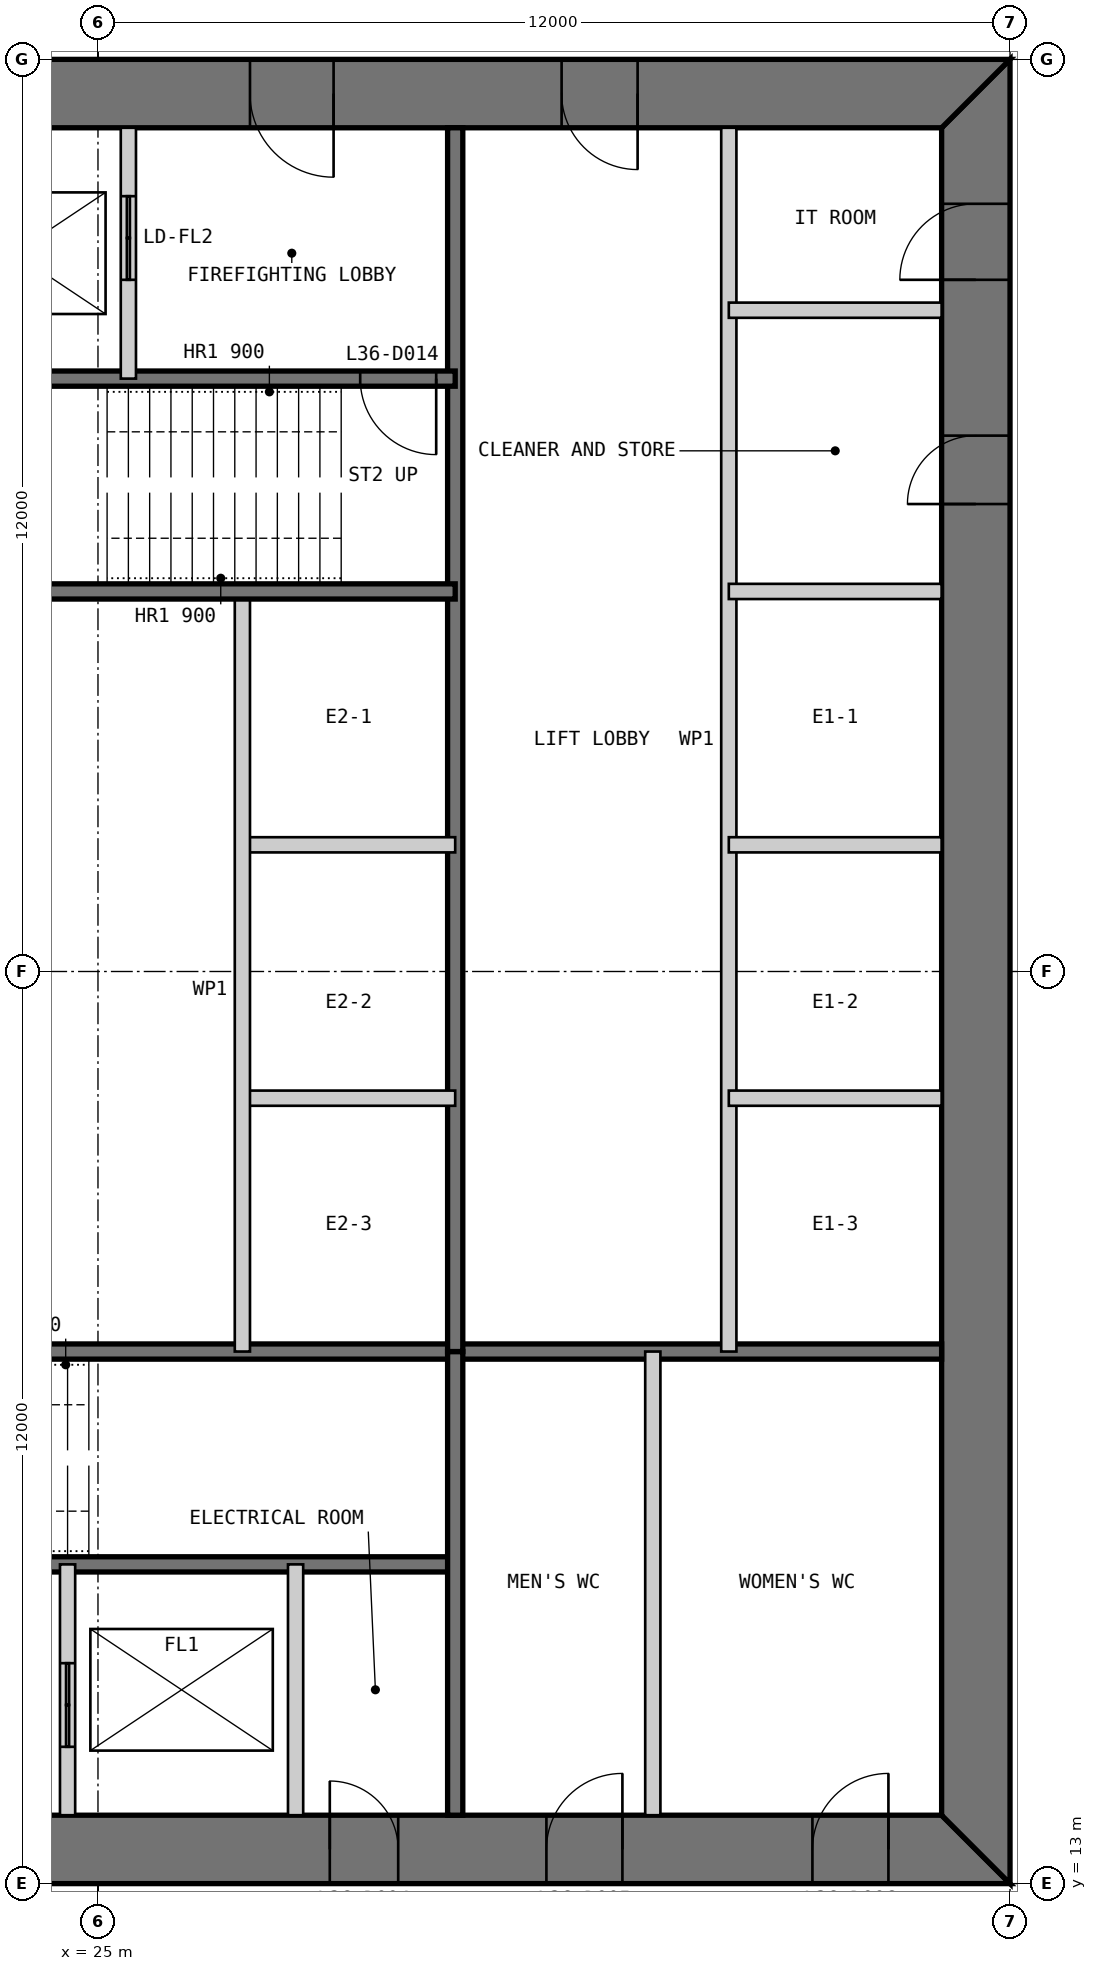
"""IFC4 building model, lengths in metres.
Left out: names, types, materials, properties, quantities, classifications, styles, units other than length and angle.
Written with IfcOpenShell. Run it as: python <this file> out.ifc"""

import sys

from ifc_helpers import new_model, si_unit, direction, frame, frame_2d, origin, place, context, subcontext, project, spatial, polyline, rectangle, outline, extrude, element, fill, save


model = new_model("IFC4")
c1 = context("Model", 3, precision=1e-05, world=origin(), true_north=direction((0.0, 1.0)))
c2 = subcontext(c1, "Body", "Model", "MODEL_VIEW")
j1 = project(units=[si_unit("LENGTHUNIT", "METRE"), si_unit("PLANEANGLEUNIT", "RADIAN")], contexts=[c1])
p1 = place(None, origin())
s1 = spatial("IfcSite", under=j1, at=p1, CompositionType="ELEMENT")
p2 = place(p1, origin())
s2 = spatial("IfcBuilding", under=s1, at=p2, CompositionType="ELEMENT")
p3 = place(p2, frame((0.0, 0.0, 154.4)))
s3 = spatial("IfcBuildingStorey", under=s2, at=p3, CompositionType="ELEMENT", Elevation=154.4)
p4 = place(p3, frame((13.0, 13.45, 0.0), z_axis=(0.0, 0.0, 1.0), x_axis=(1.0, 0.0, 0.0)))
e1 = element("IfcWall", 1, at=p4, inside=s3, PredefinedType="SHEAR", context=c2, shape_type="SweptSolid", body=[
    extrude(outline(polyline([(0.0, -0.45), (24.0, -0.45), (23.1, 0.45), (0.9, 0.45), (0.0, -0.45)])), origin(), (0.0, 0.0, 1.0), 4.0),
])
p5 = place(p4, frame((4.9, 0.0, 0.0)))
e2 = element("IfcOpeningElement", 2, at=p5, cuts=e1, PredefinedType="OPENING", context=c2, shape_type="SweptSolid", body=[
    extrude(rectangle(XDim=1.0, YDim=2.2, at=frame_2d((0.5, 1.1))), frame((0.0, 0.46, 0.0), z_axis=(0.0, -1.0, 0.0), x_axis=(1.0, 0.0, 0.0)), (0.0, 0.0, 1.0), 0.92),
])
p6 = place(p4, frame((8.9, 0.0, 0.0)))
e3 = element("IfcOpeningElement", 3, at=p6, cuts=e1, PredefinedType="OPENING", context=c2, shape_type="SweptSolid", body=[
    extrude(rectangle(XDim=1.1, YDim=2.2, at=frame_2d((0.55, 1.1))), frame((0.0, 0.46, 0.0), z_axis=(0.0, -1.0, 0.0), x_axis=(1.0, 0.0, 0.0)), (0.0, 0.0, 1.0), 0.92),
])
p7 = place(p4, frame((15.05, 0.0, 0.0)))
e4 = element("IfcOpeningElement", 4, at=p7, cuts=e1, PredefinedType="OPENING", context=c2, shape_type="SweptSolid", body=[
    extrude(rectangle(XDim=0.9, YDim=2.2, at=frame_2d((0.45, 1.1))), frame((0.0, 0.46, 0.0), z_axis=(0.0, -1.0, 0.0), x_axis=(1.0, 0.0, 0.0)), (0.0, 0.0, 1.0), 0.92),
])
p8 = place(p4, frame((17.9, 0.0, 0.0)))
e5 = element("IfcOpeningElement", 5, at=p8, cuts=e1, PredefinedType="OPENING", context=c2, shape_type="SweptSolid", body=[
    extrude(rectangle(XDim=1.0, YDim=2.2, at=frame_2d((0.5, 1.1))), frame((0.0, 0.46, 0.0), z_axis=(0.0, -1.0, 0.0), x_axis=(1.0, 0.0, 0.0)), (0.0, 0.0, 1.0), 0.92),
])
p9 = place(p4, frame((21.4, 0.0, 0.0)))
e6 = element("IfcOpeningElement", 6, at=p9, cuts=e1, PredefinedType="OPENING", context=c2, shape_type="SweptSolid", body=[
    extrude(rectangle(XDim=1.0, YDim=2.2, at=frame_2d((0.5, 1.1))), frame((0.0, 0.46, 0.0), z_axis=(0.0, -1.0, 0.0), x_axis=(1.0, 0.0, 0.0)), (0.0, 0.0, 1.0), 0.92),
])
p10 = place(p3, frame((36.55, 13.9, 0.0), z_axis=(0.0, 0.0, 1.0), x_axis=(0.0, 1.0, 0.0)))
e7 = element("IfcWall", 7, at=p10, inside=s3, PredefinedType="SHEAR", context=c2, shape_type="SweptSolid", body=[
    extrude(outline(polyline([(-0.9, -0.45), (23.1, -0.45), (22.2, 0.45), (0.0, 0.45), (-0.9, -0.45)])), origin(), (0.0, 0.0, 1.0), 4.0),
])
p11 = place(p10, frame((20.2, 0.0, 0.0)))
e8 = element("IfcOpeningElement", 8, at=p11, cuts=e7, PredefinedType="OPENING", context=c2, shape_type="SweptSolid", body=[
    extrude(rectangle(XDim=1.0, YDim=2.2, at=frame_2d((0.5, 1.1))), frame((0.0, 0.46, 0.0), z_axis=(0.0, -1.0, 0.0), x_axis=(1.0, 0.0, 0.0)), (0.0, 0.0, 1.0), 0.92),
])
p12 = place(p10, frame((17.25, 0.0, 0.0)))
e9 = element("IfcOpeningElement", 9, at=p12, cuts=e7, PredefinedType="OPENING", context=c2, shape_type="SweptSolid", body=[
    extrude(rectangle(XDim=0.9, YDim=2.2, at=frame_2d((0.45, 1.1))), frame((0.0, 0.46, 0.0), z_axis=(0.0, -1.0, 0.0), x_axis=(1.0, 0.0, 0.0)), (0.0, 0.0, 1.0), 0.92),
])
p13 = place(p3, frame((37.0, 36.55, 0.0), z_axis=(0.0, 0.0, 1.0), x_axis=(-1.0, 0.0, 0.0)))
e10 = element("IfcWall", 10, at=p13, inside=s3, PredefinedType="SHEAR", context=c2, shape_type="SweptSolid", body=[
    extrude(outline(polyline([(0.0, -0.45), (24.0, -0.45), (23.1, 0.45), (0.9, 0.45), (0.0, -0.45)])), origin(), (0.0, 0.0, 1.0), 4.0),
])
p14 = place(p13, frame((4.9, 0.0, 0.0)))
e11 = element("IfcOpeningElement", 11, at=p14, cuts=e10, PredefinedType="OPENING", context=c2, shape_type="SweptSolid", body=[
    extrude(rectangle(XDim=1.0, YDim=2.2, at=frame_2d((0.5, 1.1))), frame((0.0, 0.46, 0.0), z_axis=(0.0, -1.0, 0.0), x_axis=(1.0, 0.0, 0.0)), (0.0, 0.0, 1.0), 0.92),
])
p15 = place(p13, frame((8.9, 0.0, 0.0)))
e12 = element("IfcOpeningElement", 12, at=p15, cuts=e10, PredefinedType="OPENING", context=c2, shape_type="SweptSolid", body=[
    extrude(rectangle(XDim=1.1, YDim=2.2, at=frame_2d((0.55, 1.1))), frame((0.0, 0.46, 0.0), z_axis=(0.0, -1.0, 0.0), x_axis=(1.0, 0.0, 0.0)), (0.0, 0.0, 1.0), 0.92),
])
p16 = place(p13, frame((15.05, 0.0, 0.0)))
e13 = element("IfcOpeningElement", 13, at=p16, cuts=e10, PredefinedType="OPENING", context=c2, shape_type="SweptSolid", body=[
    extrude(rectangle(XDim=0.9, YDim=2.2, at=frame_2d((0.45, 1.1))), frame((0.0, 0.46, 0.0), z_axis=(0.0, -1.0, 0.0), x_axis=(1.0, 0.0, 0.0)), (0.0, 0.0, 1.0), 0.92),
])
p17 = place(p13, frame((17.9, 0.0, 0.0)))
e14 = element("IfcOpeningElement", 14, at=p17, cuts=e10, PredefinedType="OPENING", context=c2, shape_type="SweptSolid", body=[
    extrude(rectangle(XDim=1.0, YDim=2.2, at=frame_2d((0.5, 1.1))), frame((0.0, 0.46, 0.0), z_axis=(0.0, -1.0, 0.0), x_axis=(1.0, 0.0, 0.0)), (0.0, 0.0, 1.0), 0.92),
])
p18 = place(p13, frame((21.4, 0.0, 0.0)))
e15 = element("IfcOpeningElement", 15, at=p18, cuts=e10, PredefinedType="OPENING", context=c2, shape_type="SweptSolid", body=[
    extrude(rectangle(XDim=1.0, YDim=2.2, at=frame_2d((0.5, 1.1))), frame((0.0, 0.46, 0.0), z_axis=(0.0, -1.0, 0.0), x_axis=(1.0, 0.0, 0.0)), (0.0, 0.0, 1.0), 0.92),
])
p19 = place(p3, frame((20.3, 17.2, 0.0), z_axis=(0.0, 0.0, 1.0), x_axis=(1.0, 0.0, 0.0)))
e16 = element("IfcWall", 16, at=p19, inside=s3, PredefinedType="SOLIDWALL", context=c2, shape_type="SweptSolid", body=[
    extrude(rectangle(XDim=9.4, YDim=0.2, at=frame_2d((4.7, 0.0))), origin(), (0.0, 0.0, 1.0), 3.8),
])
p20 = place(p19, frame((0.25, 0.0, 0.0)))
e17 = element("IfcOpeningElement", 17, at=p20, cuts=e16, PredefinedType="OPENING", context=c2, shape_type="SweptSolid", body=[
    extrude(rectangle(XDim=1.0, YDim=2.2, at=frame_2d((0.5, 1.1))), frame((0.0, 0.11, 0.0), z_axis=(0.0, -1.0, 0.0), x_axis=(1.0, 0.0, 0.0)), (0.0, 0.0, 1.0), 0.22),
])
p21 = place(p3, frame((20.3, 20.0, 0.0), z_axis=(0.0, 0.0, 1.0), x_axis=(1.0, 0.0, 0.0)))
e18 = element("IfcWall", 18, at=p21, inside=s3, PredefinedType="SOLIDWALL", context=c2, shape_type="SweptSolid", body=[
    extrude(rectangle(XDim=15.8, YDim=0.2, at=frame_2d((7.9, 0.0))), origin(), (0.0, 0.0, 1.0), 3.8),
])
p22 = place(p3, frame((24.6, 13.9, 0.0), z_axis=(0.0, 0.0, 1.0), x_axis=(0.0, 1.0, 0.0)))
e19 = element("IfcWall", 19, at=p22, inside=s3, PredefinedType="PARTITIONING", context=c2, shape_type="SweptSolid", body=[
    extrude(rectangle(XDim=3.3, YDim=0.2, at=frame_2d((1.65, 0.0))), origin(), (0.0, 0.0, 1.0), 3.8),
])
p23 = place(p22, frame((0.9, 0.0, 0.0)))
e20 = element("IfcOpeningElement", 20, at=p23, cuts=e19, PredefinedType="OPENING", context=c2, shape_type="SweptSolid", body=[
    extrude(rectangle(XDim=1.1, YDim=2.2, at=frame_2d((0.55, 1.1))), frame((0.0, 0.11, 0.0), z_axis=(0.0, -1.0, 0.0), x_axis=(1.0, 0.0, 0.0)), (0.0, 0.0, 1.0), 0.22),
])
p24 = place(p3, frame((27.6, 13.9, 0.0), z_axis=(0.0, 0.0, 1.0), x_axis=(0.0, 1.0, 0.0)))
e21 = element("IfcWall", 21, at=p24, inside=s3, PredefinedType="PARTITIONING", context=c2, shape_type="SweptSolid", body=[
    extrude(rectangle(XDim=3.3, YDim=0.2, at=frame_2d((1.65, 0.0))), origin(), (0.0, 0.0, 1.0), 3.8),
])
p25 = place(p3, frame((29.7, 13.9, 0.0), z_axis=(0.0, 0.0, 1.0), x_axis=(0.0, 1.0, 0.0)))
e22 = element("IfcWall", 22, at=p25, inside=s3, PredefinedType="SOLIDWALL", context=c2, shape_type="SweptSolid", body=[
    extrude(rectangle(XDim=6.1, YDim=0.2, at=frame_2d((3.05, 0.0))), origin(), (0.0, 0.0, 1.0), 3.8),
])
p26 = place(p3, frame((32.3, 13.9, 0.0), z_axis=(0.0, 0.0, 1.0), x_axis=(0.0, 1.0, 0.0)))
e23 = element("IfcWall", 23, at=p26, inside=s3, PredefinedType="PARTITIONING", context=c2, shape_type="SweptSolid", body=[
    extrude(rectangle(XDim=6.1, YDim=0.2, at=frame_2d((3.05, 0.0))), origin(), (0.0, 0.0, 1.0), 3.8),
])
p27 = place(p3, frame((33.3, 36.1, 0.0), z_axis=(0.0, 0.0, 1.0), x_axis=(0.0, -1.0, 0.0)))
e24 = element("IfcWall", 24, at=p27, inside=s3, PredefinedType="PARTITIONING", context=c2, shape_type="SweptSolid", body=[
    extrude(rectangle(XDim=16.1, YDim=0.2, at=frame_2d((8.05, 0.0))), origin(), (0.0, 0.0, 1.0), 3.8),
])
p28 = place(p3, frame((29.7, 36.1, 0.0), z_axis=(0.0, 0.0, 1.0), x_axis=(0.0, -1.0, 0.0)))
e25 = element("IfcWall", 25, at=p28, inside=s3, PredefinedType="SOLIDWALL", context=c2, shape_type="SweptSolid", body=[
    extrude(rectangle(XDim=16.1, YDim=0.2, at=frame_2d((8.05, 0.0))), origin(), (0.0, 0.0, 1.0), 3.8),
])
for number, where, z_axis, x_axis in (
    (26, (36.1, 30.0, 0.0), (0.0, 0.0, 1.0), (-1.0, 0.0, 0.0)),
    (27, (36.1, 26.667, 0.0), (0.0, 0.0, 1.0), (-1.0, 0.0, 0.0)),
    (28, (36.1, 23.333, 0.0), (0.0, 0.0, 1.0), (-1.0, 0.0, 0.0)),
    (29, (29.7, 26.667, 0.0), (0.0, 0.0, 1.0), (-1.0, 0.0, 0.0)),
    (30, (29.7, 23.333, 0.0), (0.0, 0.0, 1.0), (-1.0, 0.0, 0.0)),
):
    element("IfcWall", number, at=place(p3, frame(where, z_axis=z_axis, x_axis=x_axis)), inside=s3, PredefinedType="PARTITIONING", context=c2, shape_type="SweptSolid", body=[
        extrude(rectangle(XDim=2.8, YDim=0.2, at=frame_2d((1.4, 0.0))), origin(), (0.0, 0.0, 1.0), 3.8),
    ])
p29 = place(p3, frame((26.9, 30.0, 0.0), z_axis=(0.0, 0.0, 1.0), x_axis=(0.0, -1.0, 0.0)))
e31 = element("IfcWall", 31, at=p29, inside=s3, PredefinedType="PARTITIONING", context=c2, shape_type="SweptSolid", body=[
    extrude(rectangle(XDim=10.0, YDim=0.2, at=frame_2d((5.0, 0.0))), origin(), (0.0, 0.0, 1.0), 3.8),
])
p30 = place(p3, frame((29.7, 32.8, 0.0), z_axis=(0.0, 0.0, 1.0), x_axis=(-1.0, 0.0, 0.0)))
e32 = element("IfcWall", 32, at=p30, inside=s3, PredefinedType="SOLIDWALL", context=c2, shape_type="SweptSolid", body=[
    extrude(rectangle(XDim=9.4, YDim=0.2, at=frame_2d((4.7, 0.0))), origin(), (0.0, 0.0, 1.0), 3.8),
])
p31 = place(p30, frame((0.25, 0.0, 0.0)))
e33 = element("IfcOpeningElement", 33, at=p31, cuts=e32, PredefinedType="OPENING", context=c2, shape_type="SweptSolid", body=[
    extrude(rectangle(XDim=1.0, YDim=2.2, at=frame_2d((0.5, 1.1))), frame((0.0, 0.11, 0.0), z_axis=(0.0, -1.0, 0.0), x_axis=(1.0, 0.0, 0.0)), (0.0, 0.0, 1.0), 0.22),
])
p32 = place(p3, frame((29.7, 30.0, 0.0), z_axis=(0.0, 0.0, 1.0), x_axis=(-1.0, 0.0, 0.0)))
e34 = element("IfcWall", 34, at=p32, inside=s3, PredefinedType="SOLIDWALL", context=c2, shape_type="SweptSolid", body=[
    extrude(rectangle(XDim=15.8, YDim=0.2, at=frame_2d((7.9, 0.0))), origin(), (0.0, 0.0, 1.0), 3.8),
])
p33 = place(p3, frame((25.4, 36.1, 0.0), z_axis=(0.0, 0.0, 1.0), x_axis=(0.0, -1.0, 0.0)))
e35 = element("IfcWall", 35, at=p33, inside=s3, PredefinedType="PARTITIONING", context=c2, shape_type="SweptSolid", body=[
    extrude(rectangle(XDim=3.3, YDim=0.2, at=frame_2d((1.65, 0.0))), origin(), (0.0, 0.0, 1.0), 3.8),
])
p34 = place(p33, frame((0.9, 0.0, 0.0)))
e36 = element("IfcOpeningElement", 36, at=p34, cuts=e35, PredefinedType="OPENING", context=c2, shape_type="SweptSolid", body=[
    extrude(rectangle(XDim=1.1, YDim=2.2, at=frame_2d((0.55, 1.1))), frame((0.0, 0.11, 0.0), z_axis=(0.0, -1.0, 0.0), x_axis=(1.0, 0.0, 0.0)), (0.0, 0.0, 1.0), 0.22),
])
p35 = place(p3, frame((36.1, 33.7, 0.0), z_axis=(0.0, 0.0, 1.0), x_axis=(-1.0, 0.0, 0.0)))
e37 = element("IfcWall", 37, at=p35, inside=s3, PredefinedType="PARTITIONING", context=c2, shape_type="SweptSolid", body=[
    extrude(rectangle(XDim=2.8, YDim=0.2, at=frame_2d((1.4, 0.0))), origin(), (0.0, 0.0, 1.0), 3.8),
])
p36 = place(p7, origin())
e38 = element("IfcDoor", 38, at=p36, inside=s3, OperationType="SINGLE_SWING_LEFT", PredefinedType="DOOR", context=c2, shape_type="SweptSolid", body=[
    extrude(rectangle(XDim=0.9, YDim=2.2, at=frame_2d((0.45, 1.1))), frame((0.0, 0.025, 0.0), z_axis=(0.0, -1.0, 0.0), x_axis=(1.0, 0.0, 0.0)), (0.0, 0.0, 1.0), 0.05),
    extrude(outline(polyline([(0.0, 0.0), (0.04, 0.0), (0.04, 2.16), (0.86, 2.16), (0.86, 0.0), (0.9, 0.0), (0.9, 2.2), (0.0, 2.2), (0.0, 0.0)])), frame((0.0, 0.3, 0.0), z_axis=(0.0, -1.0, 0.0), x_axis=(1.0, 0.0, 0.0)), (0.0, 0.0, 1.0), 0.6),
])
fill(e4, e38)
p37 = place(p8, origin())
e39 = element("IfcDoor", 39, at=p37, inside=s3, OperationType="SINGLE_SWING_RIGHT", PredefinedType="DOOR", context=c2, shape_type="SweptSolid", body=[
    extrude(rectangle(XDim=1.0, YDim=2.2, at=frame_2d((0.5, 1.1))), frame((0.0, 0.025, 0.0), z_axis=(0.0, -1.0, 0.0), x_axis=(1.0, 0.0, 0.0)), (0.0, 0.0, 1.0), 0.05),
    extrude(outline(polyline([(0.0, 0.0), (0.04, 0.0), (0.04, 2.16), (0.96, 2.16), (0.96, 0.0), (1.0, 0.0), (1.0, 2.2), (0.0, 2.2), (0.0, 0.0)])), frame((0.0, 0.3, 0.0), z_axis=(0.0, -1.0, 0.0), x_axis=(1.0, 0.0, 0.0)), (0.0, 0.0, 1.0), 0.6),
])
fill(e5, e39)
p38 = place(p9, origin())
e40 = element("IfcDoor", 40, at=p38, inside=s3, OperationType="SINGLE_SWING_RIGHT", PredefinedType="DOOR", context=c2, shape_type="SweptSolid", body=[
    extrude(rectangle(XDim=1.0, YDim=2.2, at=frame_2d((0.5, 1.1))), frame((0.0, 0.025, 0.0), z_axis=(0.0, -1.0, 0.0), x_axis=(1.0, 0.0, 0.0)), (0.0, 0.0, 1.0), 0.05),
    extrude(outline(polyline([(0.0, 0.0), (0.04, 0.0), (0.04, 2.16), (0.96, 2.16), (0.96, 0.0), (1.0, 0.0), (1.0, 2.2), (0.0, 2.2), (0.0, 0.0)])), frame((0.0, 0.3, 0.0), z_axis=(0.0, -1.0, 0.0), x_axis=(1.0, 0.0, 0.0)), (0.0, 0.0, 1.0), 0.6),
])
fill(e6, e40)
p39 = place(p14, origin())
e41 = element("IfcDoor", 41, at=p39, inside=s3, OperationType="SINGLE_SWING_LEFT", PredefinedType="DOOR", context=c2, shape_type="SweptSolid", body=[
    extrude(rectangle(XDim=1.0, YDim=2.2, at=frame_2d((0.5, 1.1))), frame((0.0, 0.025, 0.0), z_axis=(0.0, -1.0, 0.0), x_axis=(1.0, 0.0, 0.0)), (0.0, 0.0, 1.0), 0.05),
    extrude(outline(polyline([(0.0, 0.0), (0.04, 0.0), (0.04, 2.16), (0.96, 2.16), (0.96, 0.0), (1.0, 0.0), (1.0, 2.2), (0.0, 2.2), (0.0, 0.0)])), frame((0.0, 0.3, 0.0), z_axis=(0.0, -1.0, 0.0), x_axis=(1.0, 0.0, 0.0)), (0.0, 0.0, 1.0), 0.6),
])
fill(e11, e41)
p40 = place(p15, origin())
e42 = element("IfcDoor", 42, at=p40, inside=s3, OperationType="SINGLE_SWING_LEFT", PredefinedType="DOOR", context=c2, shape_type="SweptSolid", body=[
    extrude(rectangle(XDim=1.1, YDim=2.2, at=frame_2d((0.55, 1.1))), frame((0.0, 0.025, 0.0), z_axis=(0.0, -1.0, 0.0), x_axis=(1.0, 0.0, 0.0)), (0.0, 0.0, 1.0), 0.05),
    extrude(outline(polyline([(0.0, 0.0), (0.04, 0.0), (0.04, 2.16), (1.06, 2.16), (1.06, 0.0), (1.1, 0.0), (1.1, 2.2), (0.0, 2.2), (0.0, 0.0)])), frame((0.0, 0.3, 0.0), z_axis=(0.0, -1.0, 0.0), x_axis=(1.0, 0.0, 0.0)), (0.0, 0.0, 1.0), 0.6),
])
fill(e12, e42)
p41 = place(p31, origin())
e43 = element("IfcDoor", 43, at=p41, inside=s3, OperationType="SINGLE_SWING_LEFT", PredefinedType="DOOR", context=c2, shape_type="SweptSolid", body=[
    extrude(rectangle(XDim=1.0, YDim=2.2, at=frame_2d((0.5, 1.1))), frame((0.0, 0.025, 0.0), z_axis=(0.0, -1.0, 0.0), x_axis=(1.0, 0.0, 0.0)), (0.0, 0.0, 1.0), 0.05),
])
fill(e33, e43)
p42 = place(p11, origin())
e44 = element("IfcDoor", 44, at=p42, inside=s3, OperationType="SINGLE_SWING_LEFT", PredefinedType="DOOR", context=c2, shape_type="SweptSolid", body=[
    extrude(rectangle(XDim=1.0, YDim=2.2, at=frame_2d((0.5, 1.1))), frame((0.0, 0.025, 0.0), z_axis=(0.0, -1.0, 0.0), x_axis=(1.0, 0.0, 0.0)), (0.0, 0.0, 1.0), 0.05),
    extrude(outline(polyline([(0.0, 0.0), (0.04, 0.0), (0.04, 2.16), (0.96, 2.16), (0.96, 0.0), (1.0, 0.0), (1.0, 2.2), (0.0, 2.2), (0.0, 0.0)])), frame((0.0, 0.3, 0.0), z_axis=(0.0, -1.0, 0.0), x_axis=(1.0, 0.0, 0.0)), (0.0, 0.0, 1.0), 0.6),
])
fill(e8, e44)
p43 = place(p12, origin())
e45 = element("IfcDoor", 45, at=p43, inside=s3, OperationType="SINGLE_SWING_LEFT", PredefinedType="DOOR", context=c2, shape_type="SweptSolid", body=[
    extrude(rectangle(XDim=0.9, YDim=2.2, at=frame_2d((0.45, 1.1))), frame((0.0, 0.025, 0.0), z_axis=(0.0, -1.0, 0.0), x_axis=(1.0, 0.0, 0.0)), (0.0, 0.0, 1.0), 0.05),
    extrude(outline(polyline([(0.0, 0.0), (0.04, 0.0), (0.04, 2.16), (0.86, 2.16), (0.86, 0.0), (0.9, 0.0), (0.9, 2.2), (0.0, 2.2), (0.0, 0.0)])), frame((0.0, 0.3, 0.0), z_axis=(0.0, -1.0, 0.0), x_axis=(1.0, 0.0, 0.0)), (0.0, 0.0, 1.0), 0.6),
])
fill(e9, e45)
p44 = place(p23, origin())
e46 = element("IfcDoor", 46, at=p44, inside=s3, OperationType="DOUBLE_DOOR_SLIDING", PredefinedType="DOOR", context=c2, shape_type="SweptSolid", body=[
    extrude(rectangle(XDim=1.1, YDim=2.2, at=frame_2d((0.55, 1.1))), frame((0.0, 0.025, 0.0), z_axis=(0.0, -1.0, 0.0), x_axis=(1.0, 0.0, 0.0)), (0.0, 0.0, 1.0), 0.05),
])
fill(e20, e46)
p45 = place(p34, origin())
e47 = element("IfcDoor", 47, at=p45, inside=s3, OperationType="DOUBLE_DOOR_SLIDING", PredefinedType="DOOR", context=c2, shape_type="SweptSolid", body=[
    extrude(rectangle(XDim=1.1, YDim=2.2, at=frame_2d((0.55, 1.1))), frame((0.0, 0.025, 0.0), z_axis=(0.0, -1.0, 0.0), x_axis=(1.0, 0.0, 0.0)), (0.0, 0.0, 1.0), 0.05),
])
fill(e36, e47)
save(model, sys.argv[1])
